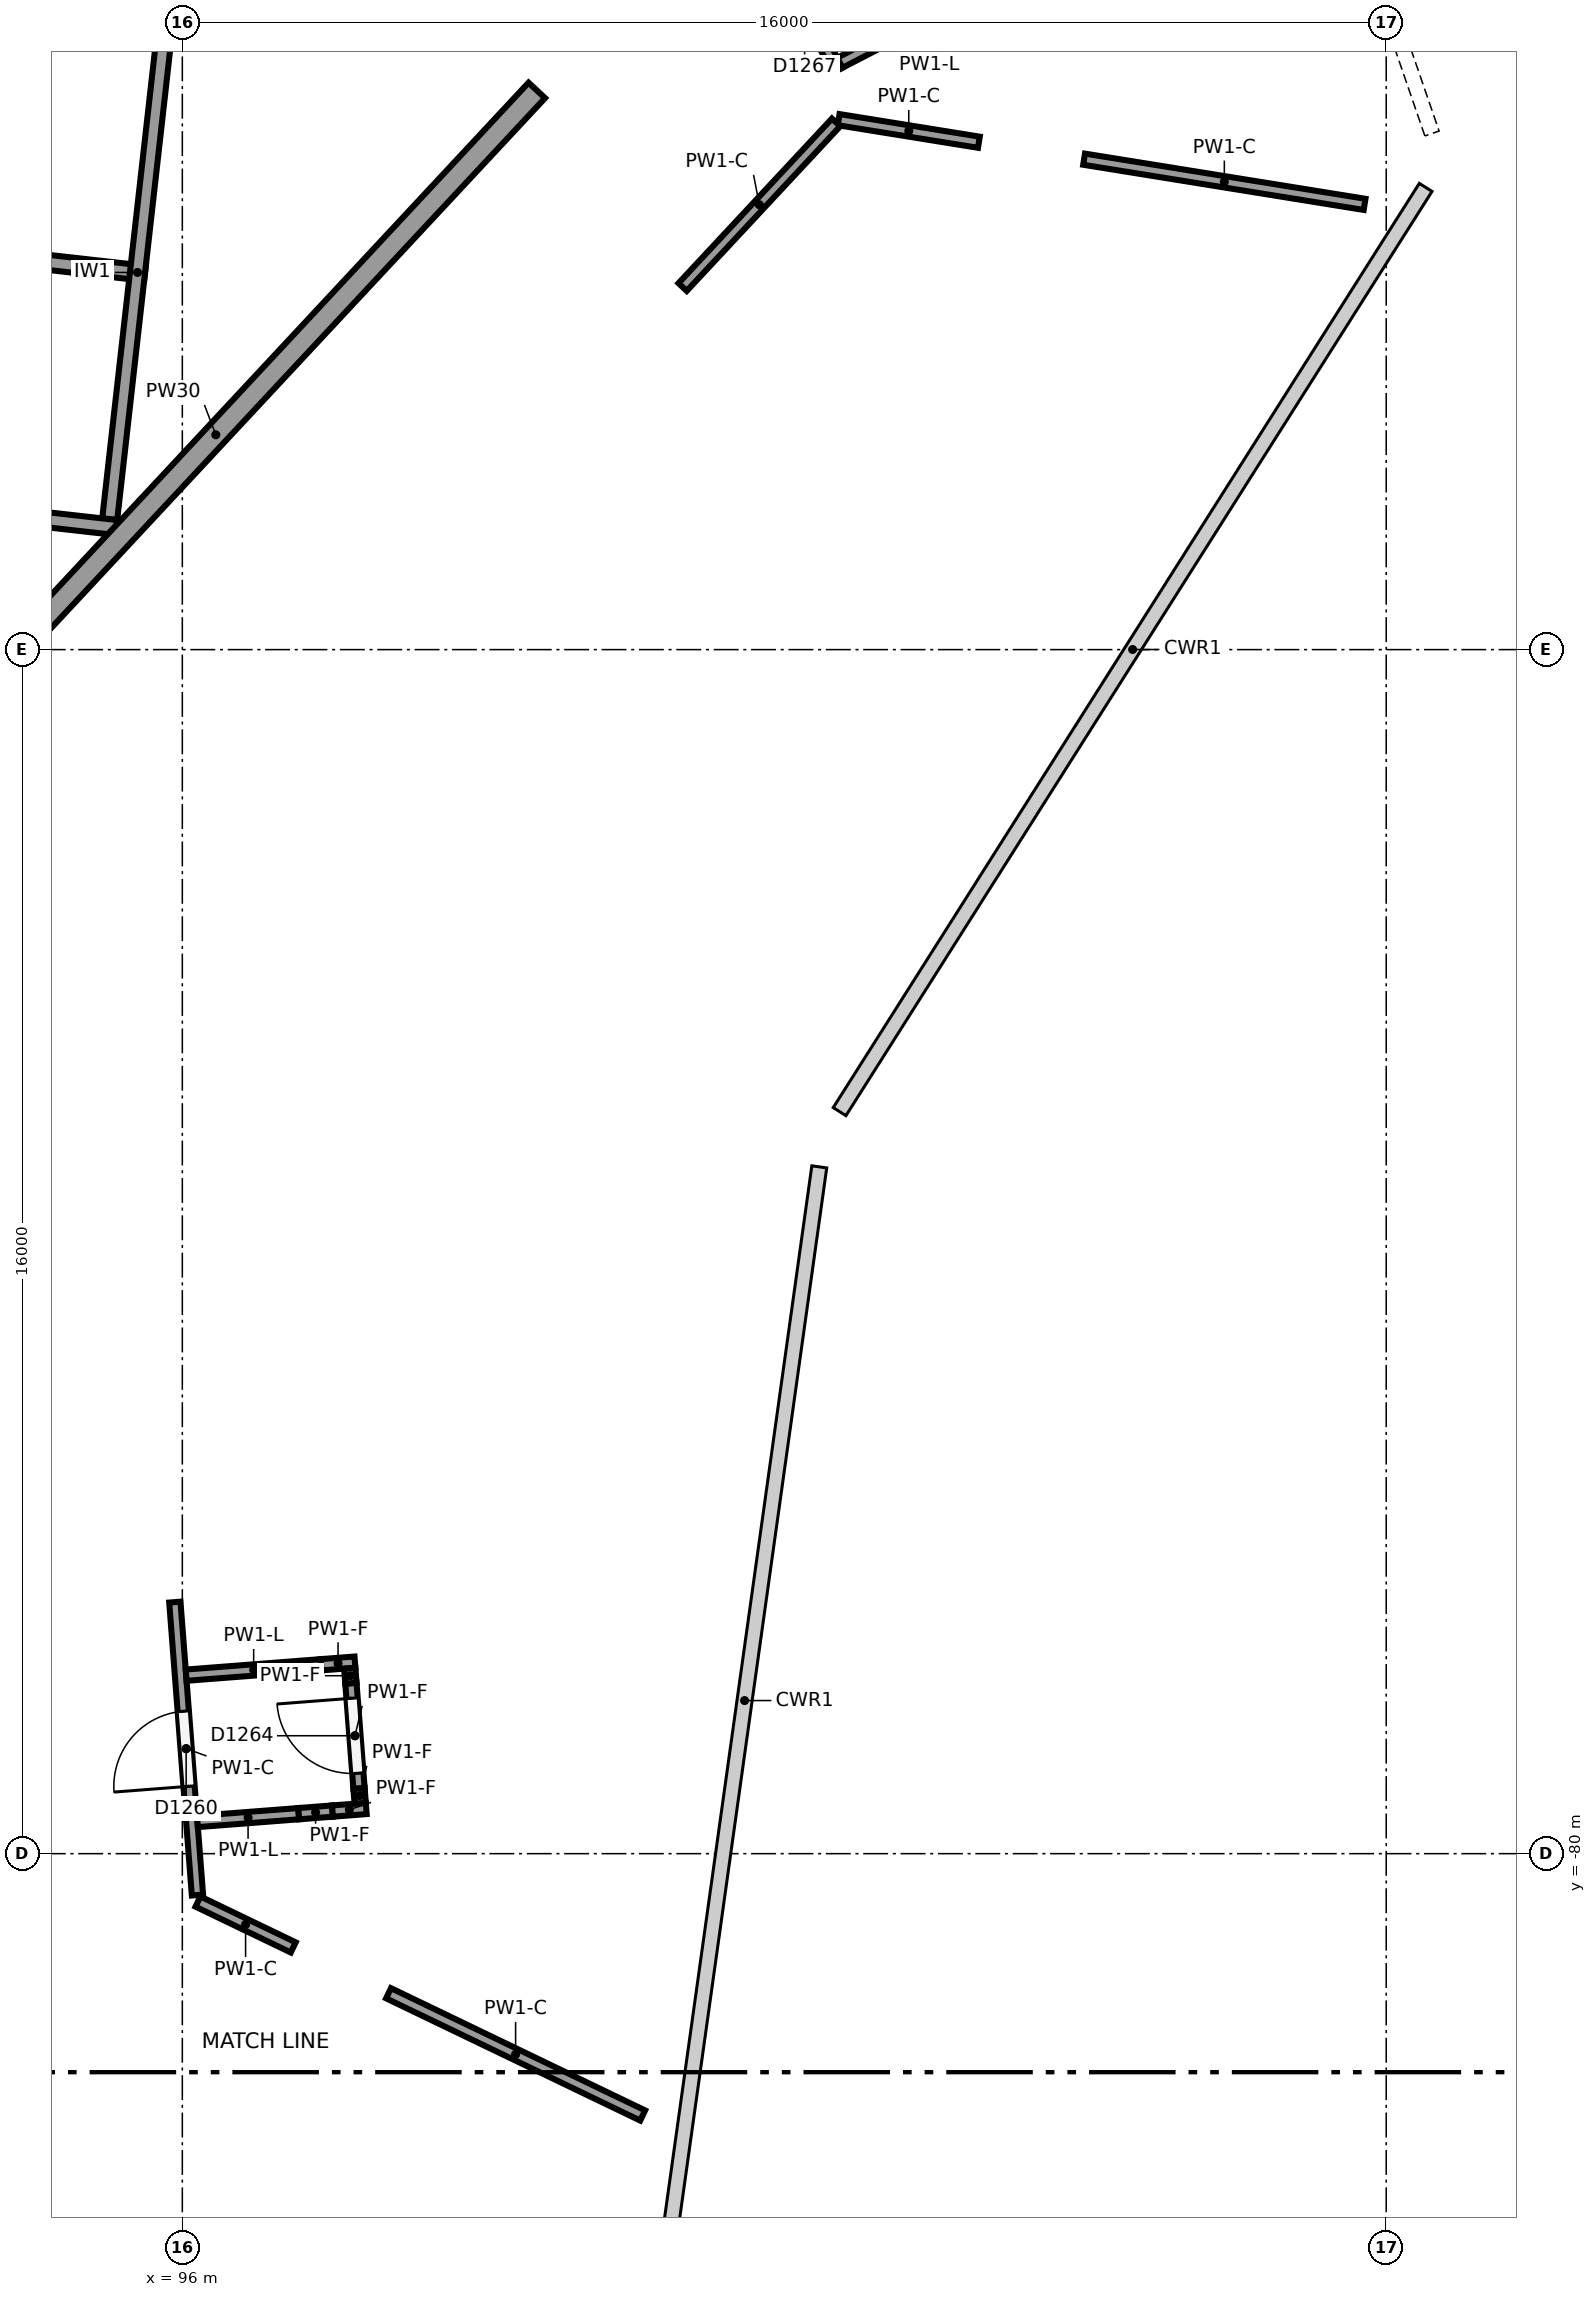
"""IFC4 building model, lengths in metres.
Left out: names, types, materials, properties, quantities, classifications, styles, units other than length and angle.
Written with IfcOpenShell. Run it as: python <this file> out.ifc"""

import sys

from ifc_helpers import new_model, si_unit, direction, frame, frame_2d, origin, origin_2d, place, context, subcontext, project, spatial, rectangle, circle, extrude, element, fill, save


model = new_model("IFC4")
c1 = context("Model", 3, precision=1e-05, world=origin(), true_north=direction((0.0, 1.0)))
c2 = subcontext(c1, "Body", "Model", "MODEL_VIEW")
j1 = project(units=[si_unit("LENGTHUNIT", "METRE"), si_unit("PLANEANGLEUNIT", "RADIAN")], contexts=[c1])
p1 = place(None, origin())
s1 = spatial("IfcSite", under=j1, at=p1, CompositionType="ELEMENT")
p2 = place(p1, origin())
s2 = spatial("IfcBuilding", under=s1, at=p2, CompositionType="ELEMENT")
p3 = place(p2, frame((0.0, 0.0, 12.0)))
s3 = spatial("IfcBuildingStorey", under=s2, at=p3, CompositionType="ELEMENT", Elevation=12.0)
p4 = place(p3, frame((101.052, -56.203, 0.0), z_axis=(0.0, 0.0, 1.0), x_axis=(1.0, 0.0, 0.0)))
e1 = element("IfcColumn", 1, at=p4, inside=s3, PredefinedType="COLUMN", context=c2, shape_type="SweptSolid", body=[
    extrude(circle(Radius=0.5, at=origin_2d()), origin(), (0.0, 0.0, 1.0), 6.0),
])
for number, where, z_axis, x_axis in (
    (2, (104.212, -56.559, 0.0), (0.0, 0.0, 1.0), (1.0, 0.0, 0.0)),
    (3, (107.372, -56.915, 0.0), (0.0, 0.0, 1.0), (1.0, 0.0, 0.0)),
    (4, (112.738, -57.52, 0.0), (0.0, 0.0, 1.0), (1.0, 0.0, 0.0)),
    (5, (95.38, -81.028, 0.0), (0.0, 0.0, 1.0), (1.0, 0.0, 0.0)),
    (6, (97.852, -82.581, 0.0), (0.0, 0.0, 1.0), (1.0, 0.0, 0.0)),
    (7, (95.648, -67.373, 0.0), (0.0, 0.0, 1.0), (1.0, 0.0, 0.0)),
    (8, (99.424, -68.694, 0.0), (0.0, 0.0, 1.0), (1.0, 0.0, 0.0)),
    (9, (104.521, -70.477, 0.0), (0.0, 0.0, 1.0), (1.0, 0.0, 0.0)),
):
    element("IfcColumn", number, at=place(p3, frame(where, z_axis=z_axis, x_axis=x_axis)), inside=s3, PredefinedType="COLUMN", context=c2, shape_type="SweptSolid", body=[
        extrude(circle(Radius=0.4, at=origin_2d()), origin(), (0.0, 0.0, 1.0), 6.0),
    ])
p5 = place(p3, frame((100.711, -56.568, 0.0), z_axis=(0.0, 0.0, 1.0), x_axis=(-0.681794658463, -0.731543603411, 0.0)))
e10 = element("IfcWall", 10, at=p5, inside=s3, PredefinedType="SOLIDWALL", context=c2, shape_type="SweptSolid", body=[
    extrude(rectangle(XDim=12.514, YDim=0.3, at=frame_2d((6.257, 0.0))), origin(), (0.0, 0.0, 1.0), 4.35),
])
p6 = place(p3, frame((95.123, -62.378, 0.0), z_axis=(0.0, 0.0, 1.0), x_axis=(-0.993710792168, 0.111977058046, 0.0)))
e11 = element("IfcWall", 11, at=p6, inside=s3, PredefinedType="SHEAR", context=c2, shape_type="SweptSolid", body=[
    extrude(rectangle(XDim=8.2, YDim=0.2, at=frame_2d((4.1, 0.0))), origin(), (0.0, 0.0, 1.0), 5.65),
])
p7 = place(p3, frame((95.035, -62.267, 0.0), z_axis=(0.0, 0.0, 1.0), x_axis=(0.111933579504, 0.993715690617, 0.0)))
e12 = element("IfcWall", 12, at=p7, inside=s3, PredefinedType="SHEAR", context=c2, shape_type="SweptSolid", body=[
    extrude(rectangle(XDim=6.6, YDim=0.2, at=frame_2d((3.3, 0.0))), origin(), (0.0, 0.0, 1.0), 5.65),
])
p8 = place(p3, frame((95.504, -58.999, 0.0), z_axis=(0.0, 0.0, 1.0), x_axis=(-0.993710792168, 0.111977058046, 0.0)))
e13 = element("IfcWall", 13, at=p8, inside=s3, PredefinedType="SHEAR", context=c2, shape_type="SweptSolid", body=[
    extrude(rectangle(XDim=8.2, YDim=0.2, at=frame_2d((4.1, 0.0))), origin(), (0.0, 0.0, 1.0), 5.65),
])
p9 = place(p3, frame((111.712, -58.083, 0.0), z_axis=(0.0, 0.0, 1.0), x_axis=(-0.987279127288, 0.158996618901, 0.0)))
e14 = element("IfcWall", 14, at=p9, inside=s3, PredefinedType="PARTITIONING", context=c2, shape_type="SweptSolid", body=[
    extrude(rectangle(XDim=3.776, YDim=0.15, at=frame_2d((1.888, 0.0))), origin(), (0.0, 0.0, 1.0), 5.55),
])
p10 = place(p3, frame((106.587, -57.258, 0.0), z_axis=(0.0, 0.0, 1.0), x_axis=(-0.987270611286, 0.159049489441, 0.0)))
e15 = element("IfcWall", 15, at=p10, inside=s3, PredefinedType="PARTITIONING", context=c2, shape_type="SweptSolid", body=[
    extrude(rectangle(XDim=1.888, YDim=0.15, at=frame_2d((0.944, 0.0))), origin(), (0.0, 0.0, 1.0), 5.55),
])
p11 = place(p3, frame((104.707, -56.302, 0.0), z_axis=(0.0, 0.0, 1.0), x_axis=(-0.459976248991, 0.887931219388, 0.0)))
e16 = element("IfcWall", 16, at=p11, inside=s3, PredefinedType="PARTITIONING", context=c2, shape_type="SweptSolid", body=[
    extrude(rectangle(XDim=1.944, YDim=0.15, at=frame_2d((0.972, 0.0))), origin(), (0.0, 0.0, 1.0), 5.55),
])
p12 = place(p11, frame((0.45, 0.0, 0.0)))
e17 = element("IfcOpeningElement", 17, at=p12, cuts=e16, PredefinedType="OPENING", context=c2, shape_type="SweptSolid", body=[
    extrude(rectangle(XDim=1.0, YDim=2.1, at=frame_2d((0.5, 1.05))), frame((0.0, 0.085, 0.0), z_axis=(0.0, -1.0, 0.0), x_axis=(1.0, 0.0, 0.0)), (0.0, 0.0, 1.0), 0.17),
])
p13 = place(p3, frame((102.118, -83.479, 0.0), z_axis=(0.0, 0.0, 1.0), x_axis=(-0.901188323719, 0.433427739298, 0.0)))
e18 = element("IfcWall", 18, at=p13, inside=s3, PredefinedType="PARTITIONING", context=c2, shape_type="SweptSolid", body=[
    extrude(rectangle(XDim=3.748, YDim=0.15, at=frame_2d((1.874, 0.0))), origin(), (0.0, 0.0, 1.0), 5.55),
])
p14 = place(p3, frame((97.474, -81.246, 0.0), z_axis=(0.0, 0.0, 1.0), x_axis=(-0.901167600811, 0.433470823988, 0.0)))
e19 = element("IfcWall", 19, at=p14, inside=s3, PredefinedType="PARTITIONING", context=c2, shape_type="SweptSolid", body=[
    extrude(rectangle(XDim=1.405, YDim=0.15, at=frame_2d((0.703, 0.0))), origin(), (0.0, 0.0, 1.0), 5.55),
])
p15 = place(p3, frame((96.201, -80.55, 0.0), z_axis=(0.0, 0.0, 1.0), x_axis=(-0.076969034149, 0.997033483782, 0.0)))
e20 = element("IfcWall", 20, at=p15, inside=s3, PredefinedType="PARTITIONING", context=c2, shape_type="SweptSolid", body=[
    extrude(rectangle(XDim=3.905, YDim=0.15, at=frame_2d((1.952, 0.0))), origin(), (0.0, 0.0, 1.0), 5.55),
])
p16 = place(p15, frame((1.45, 0.0, 0.0)))
e21 = element("IfcOpeningElement", 21, at=p16, cuts=e20, PredefinedType="OPENING", context=c2, shape_type="SweptSolid", body=[
    extrude(rectangle(XDim=1.0, YDim=2.1, at=frame_2d((0.5, 1.05))), frame((0.0, 0.085, 0.0), z_axis=(0.0, -1.0, 0.0), x_axis=(1.0, 0.0, 0.0)), (0.0, 0.0, 1.0), 0.17),
])
p17 = place(p3, frame((102.649, -59.182, 0.0), z_axis=(0.0, 0.0, 1.0), x_axis=(0.681774249461, 0.731562623958, 0.0)))
e22 = element("IfcWall", 22, at=p17, inside=s3, PredefinedType="PARTITIONING", context=c2, shape_type="SweptSolid", body=[
    extrude(rectangle(XDim=2.991, YDim=0.15, at=frame_2d((1.496, 0.0))), origin(), (0.0, 0.0, 1.0), 5.55),
])
p18 = place(p3, frame((104.74, -56.201, 0.0), z_axis=(0.0, 0.0, 1.0), x_axis=(0.887889843187, 0.460056112193, 0.0)))
e23 = element("IfcWall", 23, at=p18, inside=s3, PredefinedType="PARTITIONING", context=c2, shape_type="SweptSolid", body=[
    extrude(rectangle(XDim=1.72, YDim=0.15, at=frame_2d((0.86, 0.0))), origin(), (0.0, 0.0, 1.0), 5.6),
])
p19 = place(p3, frame((96.201, -79.573, 0.0), z_axis=(0.0, 0.0, 1.0), x_axis=(0.997028903068, 0.077028348333, 0.0)))
e24 = element("IfcWall", 24, at=p19, inside=s3, PredefinedType="PARTITIONING", context=c2, shape_type="SweptSolid", body=[
    extrude(rectangle(XDim=1.35, YDim=0.15, at=frame_2d((0.675, 0.0))), origin(), (0.0, 0.0, 1.0), 5.6),
])
p20 = place(p3, frame((97.547, -79.469, 0.0), z_axis=(0.0, 0.0, 1.0), x_axis=(0.997070419096, 0.076489080029, 0.0)))
e25 = element("IfcWall", 25, at=p20, inside=s3, PredefinedType="PARTITIONING", context=c2, shape_type="SweptSolid", body=[
    extrude(rectangle(XDim=0.45, YDim=0.15, at=frame_2d((0.225, 0.0))), origin(), (0.0, 0.0, 1.0), 4.3),
])
p21 = place(p3, frame((97.996, -79.434, 0.0), z_axis=(0.0, 0.0, 1.0), x_axis=(0.997025681882, 0.077070030935, 0.0)))
e26 = element("IfcWall", 26, at=p21, inside=s3, PredefinedType="PARTITIONING", context=c2, shape_type="SweptSolid", body=[
    extrude(rectangle(XDim=0.45, YDim=0.15, at=frame_2d((0.225, 0.0))), origin(), (0.0, 0.0, 1.0), 4.3),
])
p22 = place(p3, frame((96.051, -77.628, 0.0), z_axis=(0.0, 0.0, 1.0), x_axis=(0.997028098262, 0.077038764768, 0.0)))
e27 = element("IfcWall", 27, at=p22, inside=s3, PredefinedType="PARTITIONING", context=c2, shape_type="SweptSolid", body=[
    extrude(rectangle(XDim=1.8, YDim=0.15, at=frame_2d((0.9, 0.0))), origin(), (0.0, 0.0, 1.0), 5.6),
])
p23 = place(p3, frame((97.845, -77.49, 0.0), z_axis=(0.0, 0.0, 1.0), x_axis=(0.997028903068, 0.077028348333, 0.0)))
e28 = element("IfcWall", 28, at=p23, inside=s3, PredefinedType="PARTITIONING", context=c2, shape_type="SweptSolid", body=[
    extrude(rectangle(XDim=0.45, YDim=0.15, at=frame_2d((0.225, 0.0))), origin(), (0.0, 0.0, 1.0), 4.3),
])
p24 = place(p3, frame((98.364, -79.33, 0.0), z_axis=(0.0, 0.0, 1.0), x_axis=(-0.076883141957, 0.997040110769, 0.0)))
e29 = element("IfcWall", 29, at=p24, inside=s3, PredefinedType="PARTITIONING", context=c2, shape_type="SweptSolid", body=[
    extrude(rectangle(XDim=0.2, YDim=0.15, at=frame_2d((0.1, 0.0))), origin(), (0.0, 0.0, 1.0), 4.3),
])
p25 = place(p3, frame((98.348, -79.131, 0.0), z_axis=(0.0, 0.0, 1.0), x_axis=(-0.076909879213, 0.997038048662, 0.0)))
e30 = element("IfcWall", 30, at=p25, inside=s3, PredefinedType="PARTITIONING", context=c2, shape_type="SweptSolid", body=[
    extrude(rectangle(XDim=1.4, YDim=0.15, at=frame_2d((0.7, 0.0))), origin(), (0.0, 0.0, 1.0), 4.3),
])
p26 = place(p25, frame((0.2, 0.0, 0.0)))
e31 = element("IfcOpeningElement", 31, at=p26, cuts=e30, PredefinedType="OPENING", context=c2, shape_type="SweptSolid", body=[
    extrude(rectangle(XDim=1.0, YDim=2.1, at=frame_2d((0.5, 1.05))), frame((0.0, 0.085, 0.0), z_axis=(0.0, -1.0, 0.0), x_axis=(1.0, 0.0, 0.0)), (0.0, 0.0, 1.0), 0.17),
])
p27 = place(p3, frame((98.24, -77.735, 0.0), z_axis=(0.0, 0.0, 1.0), x_axis=(-0.076883141957, 0.997040110769, 0.0)))
e32 = element("IfcWall", 32, at=p27, inside=s3, PredefinedType="PARTITIONING", context=c2, shape_type="SweptSolid", body=[
    extrude(rectangle(XDim=0.2, YDim=0.15, at=frame_2d((0.1, 0.0))), origin(), (0.0, 0.0, 1.0), 4.3),
])
p28 = place(p16, origin())
e33 = element("IfcDoor", 33, at=p28, inside=s3, OperationType="SINGLE_SWING_LEFT", PredefinedType="DOOR", context=c2, shape_type="SweptSolid", body=[
    extrude(rectangle(XDim=1.0, YDim=2.1, at=frame_2d((0.5, 1.05))), frame((0.0, 0.025, 0.0), z_axis=(0.0, -1.0, 0.0), x_axis=(1.0, 0.0, 0.0)), (0.0, 0.0, 1.0), 0.05),
])
fill(e21, e33)
p29 = place(p26, origin())
e34 = element("IfcDoor", 34, at=p29, inside=s3, OperationType="SINGLE_SWING_RIGHT", PredefinedType="DOOR", context=c2, shape_type="SweptSolid", body=[
    extrude(rectangle(XDim=1.0, YDim=2.1, at=frame_2d((0.5, 1.05))), frame((0.0, 0.025, 0.0), z_axis=(0.0, -1.0, 0.0), x_axis=(1.0, 0.0, 0.0)), (0.0, 0.0, 1.0), 0.05),
])
fill(e31, e34)
save(model, sys.argv[1])
